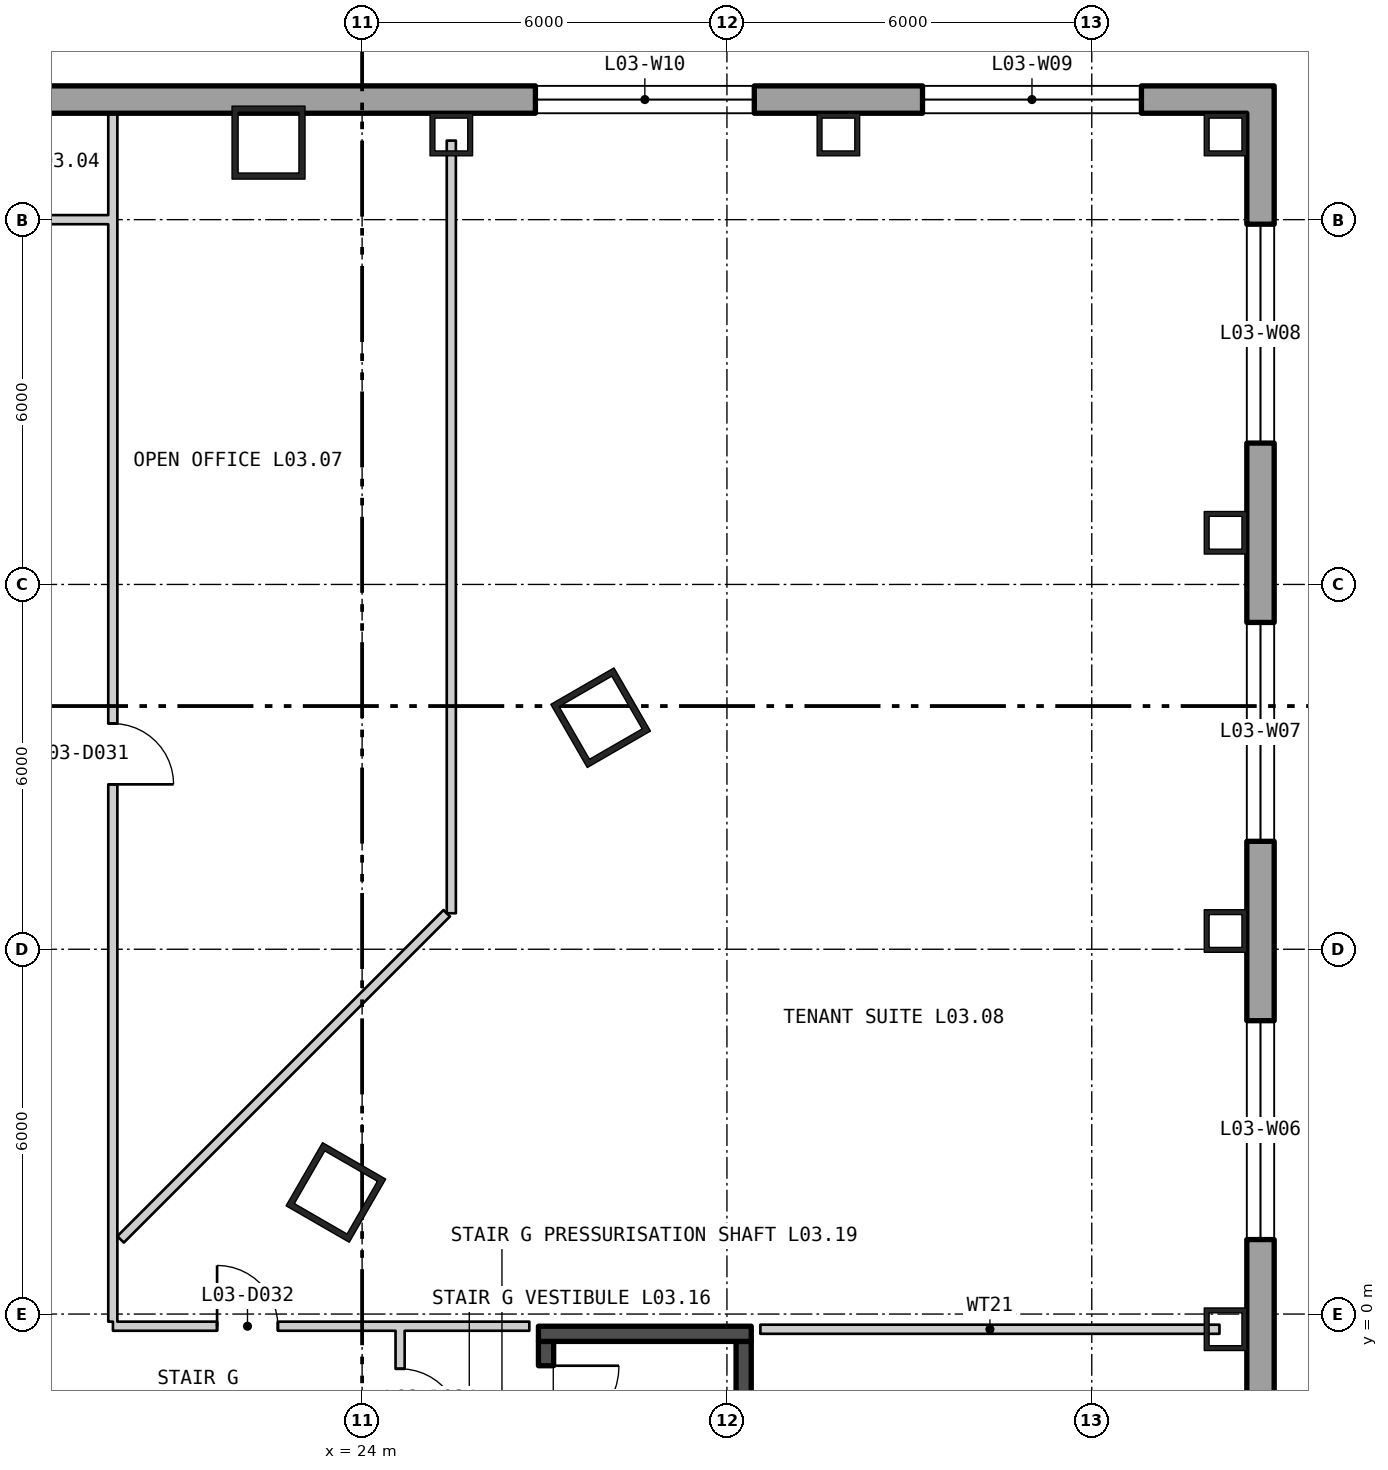
"""IFC4 building model, lengths in metres.
Left out: names, types, materials, properties, quantities, classifications, styles, units other than length and angle.
Written with IfcOpenShell. Run it as: python <this file> out.ifc"""

import sys

from ifc_helpers import new_model, si_unit, direction, frame, frame_2d, origin, origin_2d, place, context, subcontext, project, spatial, polyline, rectangle, hollow_rectangle, outline, extrude, element, fill, save


model = new_model("IFC4")
c1 = context("Model", 3, precision=1e-05, world=origin(), true_north=direction((0.0, 1.0)))
c2 = subcontext(c1, "Body", "Model", "MODEL_VIEW")
j1 = project(units=[si_unit("LENGTHUNIT", "METRE"), si_unit("PLANEANGLEUNIT", "RADIAN")], contexts=[c1])
p1 = place(None, origin())
s1 = spatial("IfcSite", under=j1, at=p1, CompositionType="ELEMENT")
p2 = place(p1, origin())
s2 = spatial("IfcBuilding", under=s1, at=p2, CompositionType="ELEMENT")
p3 = place(p2, frame((0.0, 0.0, 18.6)))
s3 = spatial("IfcBuildingStorey", under=s2, at=p3, CompositionType="ELEMENT", Elevation=18.6)
for number, where, z_axis, x_axis in (
    (1, (22.461, 19.267, 0.0), (0.0, 0.0, 1.0), (-1.0, 0.0, 0.0)),
    (2, (23.569, 2.0, 0.0), (0.0, 0.0, 1.0), (0.5, 0.866, 0.0)),
    (3, (27.923, 9.808, 0.0), (0.0, 0.0, 1.0), (-0.5, 0.866, 0.0)),
):
    element("IfcColumn", number, at=place(p3, frame(where, z_axis=z_axis, x_axis=x_axis)), inside=s3, PredefinedType="COLUMN", context=c2, shape_type="SweptSolid", body=[
        extrude(hollow_rectangle(XDim=1.2, YDim=1.2, WallThickness=0.1, at=origin_2d()), origin(), (0.0, 0.0, 1.0), 5.1),
    ])
for number, where, z_axis, x_axis in (
    (4, (38.2, -0.25, 0.0), (0.0, 0.0, 1.0), (0.0, 1.0, 0.0)),
    (5, (38.2, 6.3, 0.0), (0.0, 0.0, 1.0), (0.0, 1.0, 0.0)),
    (6, (38.2, 12.85, 0.0), (0.0, 0.0, 1.0), (0.0, 1.0, 0.0)),
    (7, (38.2, 19.4, 0.0), (0.0, 0.0, 1.0), (-1.0, 0.0, 0.0)),
    (8, (31.833, 19.4, 0.0), (0.0, 0.0, 1.0), (-1.0, 0.0, 0.0)),
    (9, (25.467, 19.4, 0.0), (0.0, 0.0, 1.0), (-1.0, 0.0, 0.0)),
):
    element("IfcColumn", number, at=place(p3, frame(where, z_axis=z_axis, x_axis=x_axis)), inside=s3, PredefinedType="COLUMN", context=c2, shape_type="SweptSolid", body=[
        extrude(hollow_rectangle(XDim=0.7, YDim=0.7, WallThickness=0.08, at=origin_2d()), origin(), (0.0, 0.0, 1.0), 5.1),
    ])
p4 = place(p3, frame((38.775, -33.575, -0.4), z_axis=(0.0, 0.0, 1.0), x_axis=(0.0, 1.0, 0.0)))
e10 = element("IfcWall", 10, at=p4, inside=s3, PredefinedType="SOLIDWALL", context=c2, shape_type="SweptSolid", body=[
    extrude(outline(polyline([(-0.225, -0.225), (53.775, -0.225), (53.325, 0.225), (0.225, 0.225), (-0.225, -0.225)])), origin(), (0.0, 0.0, 1.0), 5.1),
])
p5 = place(p4, frame((2.05, 0.0, 1.3)))
e11 = element("IfcOpeningElement", 11, at=p5, cuts=e10, PredefinedType="OPENING", context=c2, shape_type="SweptSolid", body=[
    extrude(rectangle(XDim=3.6, YDim=3.2, at=frame_2d((1.8, 1.6))), frame((0.0, 0.235, 0.0), z_axis=(0.0, -1.0, 0.0), x_axis=(1.0, 0.0, 0.0)), (0.0, 0.0, 1.0), 0.47),
])
p6 = place(p4, frame((8.6, 0.0, 1.3)))
e12 = element("IfcOpeningElement", 12, at=p6, cuts=e10, PredefinedType="OPENING", context=c2, shape_type="SweptSolid", body=[
    extrude(rectangle(XDim=3.6, YDim=3.2, at=frame_2d((1.8, 1.6))), frame((0.0, 0.235, 0.0), z_axis=(0.0, -1.0, 0.0), x_axis=(1.0, 0.0, 0.0)), (0.0, 0.0, 1.0), 0.47),
])
p7 = place(p4, frame((15.15, 0.0, 1.3)))
e13 = element("IfcOpeningElement", 13, at=p7, cuts=e10, PredefinedType="OPENING", context=c2, shape_type="SweptSolid", body=[
    extrude(rectangle(XDim=3.6, YDim=3.2, at=frame_2d((1.8, 1.6))), frame((0.0, 0.235, 0.0), z_axis=(0.0, -1.0, 0.0), x_axis=(1.0, 0.0, 0.0)), (0.0, 0.0, 1.0), 0.47),
])
p8 = place(p4, frame((21.7, 0.0, 1.3)))
e14 = element("IfcOpeningElement", 14, at=p8, cuts=e10, PredefinedType="OPENING", context=c2, shape_type="SweptSolid", body=[
    extrude(rectangle(XDim=3.6, YDim=3.2, at=frame_2d((1.8, 1.6))), frame((0.0, 0.235, 0.0), z_axis=(0.0, -1.0, 0.0), x_axis=(1.0, 0.0, 0.0)), (0.0, 0.0, 1.0), 0.47),
])
p9 = place(p4, frame((28.25, 0.0, 1.3)))
e15 = element("IfcOpeningElement", 15, at=p9, cuts=e10, PredefinedType="OPENING", context=c2, shape_type="SweptSolid", body=[
    extrude(rectangle(XDim=3.6, YDim=3.2, at=frame_2d((1.8, 1.6))), frame((0.0, 0.235, 0.0), z_axis=(0.0, -1.0, 0.0), x_axis=(1.0, 0.0, 0.0)), (0.0, 0.0, 1.0), 0.47),
])
p10 = place(p4, frame((34.8, 0.0, 1.3)))
e16 = element("IfcOpeningElement", 16, at=p10, cuts=e10, PredefinedType="OPENING", context=c2, shape_type="SweptSolid", body=[
    extrude(rectangle(XDim=3.6, YDim=3.2, at=frame_2d((1.8, 1.6))), frame((0.0, 0.235, 0.0), z_axis=(0.0, -1.0, 0.0), x_axis=(1.0, 0.0, 0.0)), (0.0, 0.0, 1.0), 0.47),
])
p11 = place(p4, frame((41.35, 0.0, 1.3)))
e17 = element("IfcOpeningElement", 17, at=p11, cuts=e10, PredefinedType="OPENING", context=c2, shape_type="SweptSolid", body=[
    extrude(rectangle(XDim=3.6, YDim=3.2, at=frame_2d((1.8, 1.6))), frame((0.0, 0.235, 0.0), z_axis=(0.0, -1.0, 0.0), x_axis=(1.0, 0.0, 0.0)), (0.0, 0.0, 1.0), 0.47),
])
p12 = place(p4, frame((47.9, 0.0, 1.3)))
e18 = element("IfcOpeningElement", 18, at=p12, cuts=e10, PredefinedType="OPENING", context=c2, shape_type="SweptSolid", body=[
    extrude(rectangle(XDim=3.6, YDim=3.2, at=frame_2d((1.8, 1.6))), frame((0.0, 0.235, 0.0), z_axis=(0.0, -1.0, 0.0), x_axis=(1.0, 0.0, 0.0)), (0.0, 0.0, 1.0), 0.47),
])
p13 = place(p3, frame((38.775, 19.975, -0.4), z_axis=(0.0, 0.0, 1.0), x_axis=(-1.0, 0.0, 0.0)))
e19 = element("IfcWall", 19, at=p13, inside=s3, PredefinedType="SOLIDWALL", context=c2, shape_type="SweptSolid", body=[
    extrude(outline(polyline([(-0.225, -0.225), (77.775, -0.225), (77.325, 0.225), (0.225, 0.225), (-0.225, -0.225)])), origin(), (0.0, 0.0, 1.0), 5.1),
])
p14 = place(p13, frame((1.958, 0.0, 1.3)))
e20 = element("IfcOpeningElement", 20, at=p14, cuts=e19, PredefinedType="OPENING", context=c2, shape_type="SweptSolid", body=[
    extrude(rectangle(XDim=3.6, YDim=3.2, at=frame_2d((1.8, 1.6))), frame((0.0, 0.235, 0.0), z_axis=(0.0, -1.0, 0.0), x_axis=(1.0, 0.0, 0.0)), (0.0, 0.0, 1.0), 0.47),
])
p15 = place(p13, frame((8.325, 0.0, 1.3)))
e21 = element("IfcOpeningElement", 21, at=p15, cuts=e19, PredefinedType="OPENING", context=c2, shape_type="SweptSolid", body=[
    extrude(rectangle(XDim=3.6, YDim=3.2, at=frame_2d((1.8, 1.6))), frame((0.0, 0.235, 0.0), z_axis=(0.0, -1.0, 0.0), x_axis=(1.0, 0.0, 0.0)), (0.0, 0.0, 1.0), 0.47),
])
p16 = place(p13, frame((20.952, 0.0, 1.3)))
e22 = element("IfcOpeningElement", 22, at=p16, cuts=e19, PredefinedType="OPENING", context=c2, shape_type="SweptSolid", body=[
    extrude(rectangle(XDim=3.6, YDim=3.2, at=frame_2d((1.8, 1.6))), frame((0.0, 0.235, 0.0), z_axis=(0.0, -1.0, 0.0), x_axis=(1.0, 0.0, 0.0)), (0.0, 0.0, 1.0), 0.47),
])
p17 = place(p13, frame((27.425, 0.0, 1.3)))
e23 = element("IfcOpeningElement", 23, at=p17, cuts=e19, PredefinedType="OPENING", context=c2, shape_type="SweptSolid", body=[
    extrude(rectangle(XDim=3.6, YDim=3.2, at=frame_2d((1.8, 1.6))), frame((0.0, 0.235, 0.0), z_axis=(0.0, -1.0, 0.0), x_axis=(1.0, 0.0, 0.0)), (0.0, 0.0, 1.0), 0.47),
])
p18 = place(p13, frame((46.525, 0.0, 1.3)))
e24 = element("IfcOpeningElement", 24, at=p18, cuts=e19, PredefinedType="OPENING", context=c2, shape_type="SweptSolid", body=[
    extrude(rectangle(XDim=3.6, YDim=3.2, at=frame_2d((1.8, 1.6))), frame((0.0, 0.235, 0.0), z_axis=(0.0, -1.0, 0.0), x_axis=(1.0, 0.0, 0.0)), (0.0, 0.0, 1.0), 0.47),
])
p19 = place(p13, frame((52.998, 0.0, 1.3)))
e25 = element("IfcOpeningElement", 25, at=p19, cuts=e19, PredefinedType="OPENING", context=c2, shape_type="SweptSolid", body=[
    extrude(rectangle(XDim=3.6, YDim=3.2, at=frame_2d((1.8, 1.6))), frame((0.0, 0.235, 0.0), z_axis=(0.0, -1.0, 0.0), x_axis=(1.0, 0.0, 0.0)), (0.0, 0.0, 1.0), 0.47),
])
p20 = place(p13, frame((65.625, 0.0, 1.3)))
e26 = element("IfcOpeningElement", 26, at=p20, cuts=e19, PredefinedType="OPENING", context=c2, shape_type="SweptSolid", body=[
    extrude(rectangle(XDim=3.6, YDim=3.2, at=frame_2d((1.8, 1.6))), frame((0.0, 0.235, 0.0), z_axis=(0.0, -1.0, 0.0), x_axis=(1.0, 0.0, 0.0)), (0.0, 0.0, 1.0), 0.47),
])
p21 = place(p13, frame((71.992, 0.0, 1.3)))
e27 = element("IfcOpeningElement", 27, at=p21, cuts=e19, PredefinedType="OPENING", context=c2, shape_type="SweptSolid", body=[
    extrude(rectangle(XDim=3.6, YDim=3.2, at=frame_2d((1.8, 1.6))), frame((0.0, 0.235, 0.0), z_axis=(0.0, -1.0, 0.0), x_axis=(1.0, 0.0, 0.0)), (0.0, 0.0, 1.0), 0.47),
])
p22 = place(p3, frame((27.025, -7.75, 0.0), z_axis=(0.0, 0.0, 1.0), x_axis=(0.0, 1.0, 0.0)))
e28 = element("IfcWall", 28, at=p22, inside=s3, PredefinedType="SHEAR", context=c2, shape_type="SweptSolid", body=[
    extrude(rectangle(XDim=7.3, YDim=0.25, at=frame_2d((3.65, 0.0))), origin(), (0.0, 0.0, 1.0), 4.88),
])
p23 = place(p22, frame((5.7, 0.0, 0.0)))
e29 = element("IfcOpeningElement", 29, at=p23, cuts=e28, PredefinedType="OPENING", context=c2, shape_type="SweptSolid", body=[
    extrude(rectangle(XDim=1.2, YDim=2.1, at=frame_2d((0.6, 1.05))), frame((0.0, 0.135, 0.0), z_axis=(0.0, -1.0, 0.0), x_axis=(1.0, 0.0, 0.0)), (0.0, 0.0, 1.0), 0.27),
])
p24 = place(p3, frame((30.275, -7.75, 0.0), z_axis=(0.0, 0.0, 1.0), x_axis=(0.0, 1.0, 0.0)))
e30 = element("IfcWall", 30, at=p24, inside=s3, PredefinedType="SHEAR", context=c2, shape_type="SweptSolid", body=[
    extrude(rectangle(XDim=7.3, YDim=0.25, at=frame_2d((3.65, 0.0))), origin(), (0.0, 0.0, 1.0), 4.88),
])
p25 = place(p3, frame((26.9, -0.325, 0.0), z_axis=(0.0, 0.0, 1.0), x_axis=(1.0, 0.0, 0.0)))
e31 = element("IfcWall", 31, at=p25, inside=s3, PredefinedType="SHEAR", context=c2, shape_type="SweptSolid", body=[
    extrude(rectangle(XDim=3.5, YDim=0.25, at=frame_2d((1.75, 0.0))), origin(), (0.0, 0.0, 1.0), 4.88),
])
p26 = place(p3, frame((17.5, 18.0, 0.0), z_axis=(0.0, 0.0, 1.0), x_axis=(1.0, 0.0, 0.0)))
e32 = element("IfcWall", 32, at=p26, inside=s3, PredefinedType="PARTITIONING", context=c2, shape_type="SweptSolid", body=[
    extrude(rectangle(XDim=2.475, YDim=0.15, at=frame_2d((1.238, 0.0))), origin(), (0.0, 0.0, 1.0), 4.33),
])
p27 = place(p3, frame((19.9, -0.125, 0.0), z_axis=(0.0, 0.0, 1.0), x_axis=(0.0, 1.0, 0.0)))
e33 = element("IfcWall", 33, at=p27, inside=s3, PredefinedType="PARTITIONING", context=c2, shape_type="SweptSolid", body=[
    extrude(rectangle(XDim=1.15, YDim=0.15, at=frame_2d((0.575, 0.0))), origin(), (0.0, 0.0, 1.0), 4.88),
])
p28 = place(p3, frame((19.9, 1.025, 0.0), z_axis=(0.0, 0.0, 1.0), x_axis=(0.0, 1.0, 0.0)))
e34 = element("IfcWall", 34, at=p28, inside=s3, PredefinedType="PARTITIONING", context=c2, shape_type="SweptSolid", body=[
    extrude(rectangle(XDim=16.9, YDim=0.15, at=frame_2d((8.45, 0.0))), origin(), (0.0, 0.0, 1.0), 4.88),
])
p29 = place(p28, frame((7.687, 0.0, 0.0)))
e35 = element("IfcOpeningElement", 35, at=p29, cuts=e34, PredefinedType="OPENING", context=c2, shape_type="SweptSolid", body=[
    extrude(rectangle(XDim=1.0, YDim=2.1, at=frame_2d((0.5, 1.05))), frame((0.0, 0.085, 0.0), z_axis=(0.0, -1.0, 0.0), x_axis=(1.0, 0.0, 0.0)), (0.0, 0.0, 1.0), 0.17),
])
p30 = place(p3, frame((19.9, 18.075, 0.0), z_axis=(0.0, 0.0, 1.0), x_axis=(0.0, 1.0, 0.0)))
e36 = element("IfcWall", 36, at=p30, inside=s3, PredefinedType="PARTITIONING", context=c2, shape_type="SweptSolid", body=[
    extrude(rectangle(XDim=1.675, YDim=0.15, at=frame_2d((0.838, 0.0))), origin(), (0.0, 0.0, 1.0), 4.88),
])
p31 = place(p3, frame((19.902, -0.2, 0.0), z_axis=(0.0, 0.0, 1.0), x_axis=(1.0, 0.0, 0.0)))
e37 = element("IfcWall", 37, at=p31, inside=s3, PredefinedType="PARTITIONING", context=c2, shape_type="SweptSolid", body=[
    extrude(rectangle(XDim=6.848, YDim=0.15, at=frame_2d((3.424, 0.0))), origin(), (0.0, 0.0, 1.0), 4.88),
])
p32 = place(p31, frame((1.713, 0.0, 0.0)))
e38 = element("IfcOpeningElement", 38, at=p32, cuts=e37, PredefinedType="OPENING", context=c2, shape_type="SweptSolid", body=[
    extrude(rectangle(XDim=1.0, YDim=2.1, at=frame_2d((0.5, 1.05))), frame((0.0, 0.085, 0.0), z_axis=(0.0, -1.0, 0.0), x_axis=(1.0, 0.0, 0.0)), (0.0, 0.0, 1.0), 0.17),
])
p33 = place(p3, frame((20.028, 1.228, 0.0), z_axis=(0.0, 0.0, 1.0), x_axis=(0.707106781187, 0.707106781187, 0.0)))
e39 = element("IfcWall", 39, at=p33, inside=s3, PredefinedType="PARTITIONING", context=c2, shape_type="SweptSolid", body=[
    extrude(rectangle(XDim=7.586, YDim=0.15, at=frame_2d((3.793, 0.0))), origin(), (0.0, 0.0, 1.0), 4.88),
])
p34 = place(p3, frame((24.625, -2.525, 0.0), z_axis=(0.0, 0.0, 1.0), x_axis=(0.0, 1.0, 0.0)))
e40 = element("IfcWall", 40, at=p34, inside=s3, PredefinedType="PARTITIONING", context=c2, shape_type="SweptSolid", body=[
    extrude(rectangle(XDim=2.25, YDim=0.15, at=frame_2d((1.125, 0.0))), origin(), (0.0, 0.0, 1.0), 4.88),
])
p35 = place(p34, frame((0.625, 0.0, 0.0)))
e41 = element("IfcOpeningElement", 41, at=p35, cuts=e40, PredefinedType="OPENING", context=c2, shape_type="SweptSolid", body=[
    extrude(rectangle(XDim=1.0, YDim=2.1, at=frame_2d((0.5, 1.05))), frame((0.0, 0.085, 0.0), z_axis=(0.0, -1.0, 0.0), x_axis=(1.0, 0.0, 0.0)), (0.0, 0.0, 1.0), 0.17),
])
p36 = place(p3, frame((25.467, 6.592, 0.0), z_axis=(0.0, 0.0, 1.0), x_axis=(0.0, 1.0, 0.0)))
e42 = element("IfcWall", 42, at=p36, inside=s3, PredefinedType="PARTITIONING", context=c2, shape_type="SweptSolid", body=[
    extrude(rectangle(XDim=7.736, YDim=0.15, at=frame_2d((3.868, 0.0))), origin(), (0.0, 0.0, 1.0), 4.88),
])
p37 = place(p3, frame((25.467, 14.328, 0.0), z_axis=(0.0, 0.0, 1.0), x_axis=(0.0, 1.0, 0.0)))
e43 = element("IfcWall", 43, at=p37, inside=s3, PredefinedType="PARTITIONING", context=c2, shape_type="SweptSolid", body=[
    extrude(rectangle(XDim=4.972, YDim=0.15, at=frame_2d((2.486, 0.0))), origin(), (0.0, 0.0, 1.0), 4.28),
])
p38 = place(p3, frame((30.55, -0.25, 0.0), z_axis=(0.0, 0.0, 1.0), x_axis=(1.0, 0.0, 0.0)))
e44 = element("IfcWall", 44, at=p38, inside=s3, PredefinedType="PARTITIONING", context=c2, shape_type="SweptSolid", body=[
    extrude(rectangle(XDim=7.55, YDim=0.15, at=frame_2d((3.775, 0.0))), origin(), (0.0, 0.0, 1.0), 4.88),
])
p39 = place(p10, origin())
e45 = element("IfcWindow", 45, at=p39, inside=s3, PartitioningType="SINGLE_PANEL", PredefinedType="WINDOW", context=c2, shape_type="SweptSolid", body=[
    extrude(rectangle(XDim=3.6, YDim=3.2, at=frame_2d((1.8, 1.6))), frame((0.0, 0.105, 0.0), z_axis=(0.0, -1.0, 0.0), x_axis=(1.0, 0.0, 0.0)), (0.0, 0.0, 1.0), 0.06),
])
fill(e16, e45)
p40 = place(p11, origin())
e46 = element("IfcWindow", 46, at=p40, inside=s3, PartitioningType="SINGLE_PANEL", PredefinedType="WINDOW", context=c2, shape_type="SweptSolid", body=[
    extrude(rectangle(XDim=3.6, YDim=3.2, at=frame_2d((1.8, 1.6))), frame((0.0, 0.105, 0.0), z_axis=(0.0, -1.0, 0.0), x_axis=(1.0, 0.0, 0.0)), (0.0, 0.0, 1.0), 0.06),
])
fill(e17, e46)
p41 = place(p12, origin())
e47 = element("IfcWindow", 47, at=p41, inside=s3, PartitioningType="SINGLE_PANEL", PredefinedType="WINDOW", context=c2, shape_type="SweptSolid", body=[
    extrude(rectangle(XDim=3.6, YDim=3.2, at=frame_2d((1.8, 1.6))), frame((0.0, 0.105, 0.0), z_axis=(0.0, -1.0, 0.0), x_axis=(1.0, 0.0, 0.0)), (0.0, 0.0, 1.0), 0.06),
])
fill(e18, e47)
p42 = place(p14, origin())
e48 = element("IfcWindow", 48, at=p42, inside=s3, PartitioningType="SINGLE_PANEL", PredefinedType="WINDOW", context=c2, shape_type="SweptSolid", body=[
    extrude(rectangle(XDim=3.6, YDim=3.2, at=frame_2d((1.8, 1.6))), frame((0.0, 0.105, 0.0), z_axis=(0.0, -1.0, 0.0), x_axis=(1.0, 0.0, 0.0)), (0.0, 0.0, 1.0), 0.06),
])
fill(e20, e48)
p43 = place(p15, origin())
e49 = element("IfcWindow", 49, at=p43, inside=s3, PartitioningType="SINGLE_PANEL", PredefinedType="WINDOW", context=c2, shape_type="SweptSolid", body=[
    extrude(rectangle(XDim=3.6, YDim=3.2, at=frame_2d((1.8, 1.6))), frame((0.0, 0.105, 0.0), z_axis=(0.0, -1.0, 0.0), x_axis=(1.0, 0.0, 0.0)), (0.0, 0.0, 1.0), 0.06),
])
fill(e21, e49)
p44 = place(p23, origin())
e50 = element("IfcDoor", 50, at=p44, inside=s3, OperationType="SINGLE_SWING_RIGHT", PredefinedType="DOOR", context=c2, shape_type="SweptSolid", body=[
    extrude(rectangle(XDim=1.2, YDim=2.1, at=frame_2d((0.6, 1.05))), frame((0.0, 0.025, 0.0), z_axis=(0.0, -1.0, 0.0), x_axis=(1.0, 0.0, 0.0)), (0.0, 0.0, 1.0), 0.05),
])
fill(e29, e50)
p45 = place(p29, origin())
e51 = element("IfcDoor", 51, at=p45, inside=s3, OperationType="SINGLE_SWING_LEFT", PredefinedType="DOOR", context=c2, shape_type="SweptSolid", body=[
    extrude(rectangle(XDim=1.0, YDim=2.1, at=frame_2d((0.5, 1.05))), frame((0.0, 0.025, 0.0), z_axis=(0.0, -1.0, 0.0), x_axis=(1.0, 0.0, 0.0)), (0.0, 0.0, 1.0), 0.05),
])
fill(e35, e51)
p46 = place(p32, origin())
e52 = element("IfcDoor", 52, at=p46, inside=s3, OperationType="SINGLE_SWING_RIGHT", PredefinedType="DOOR", context=c2, shape_type="SweptSolid", body=[
    extrude(rectangle(XDim=1.0, YDim=2.1, at=frame_2d((0.5, 1.05))), frame((0.0, 0.025, 0.0), z_axis=(0.0, -1.0, 0.0), x_axis=(1.0, 0.0, 0.0)), (0.0, 0.0, 1.0), 0.05),
])
fill(e38, e52)
p47 = place(p35, origin())
e53 = element("IfcDoor", 53, at=p47, inside=s3, OperationType="SINGLE_SWING_LEFT", PredefinedType="DOOR", context=c2, shape_type="SweptSolid", body=[
    extrude(rectangle(XDim=1.0, YDim=2.1, at=frame_2d((0.5, 1.05))), frame((0.0, 0.025, 0.0), z_axis=(0.0, -1.0, 0.0), x_axis=(1.0, 0.0, 0.0)), (0.0, 0.0, 1.0), 0.05),
])
fill(e41, e53)
save(model, sys.argv[1])
